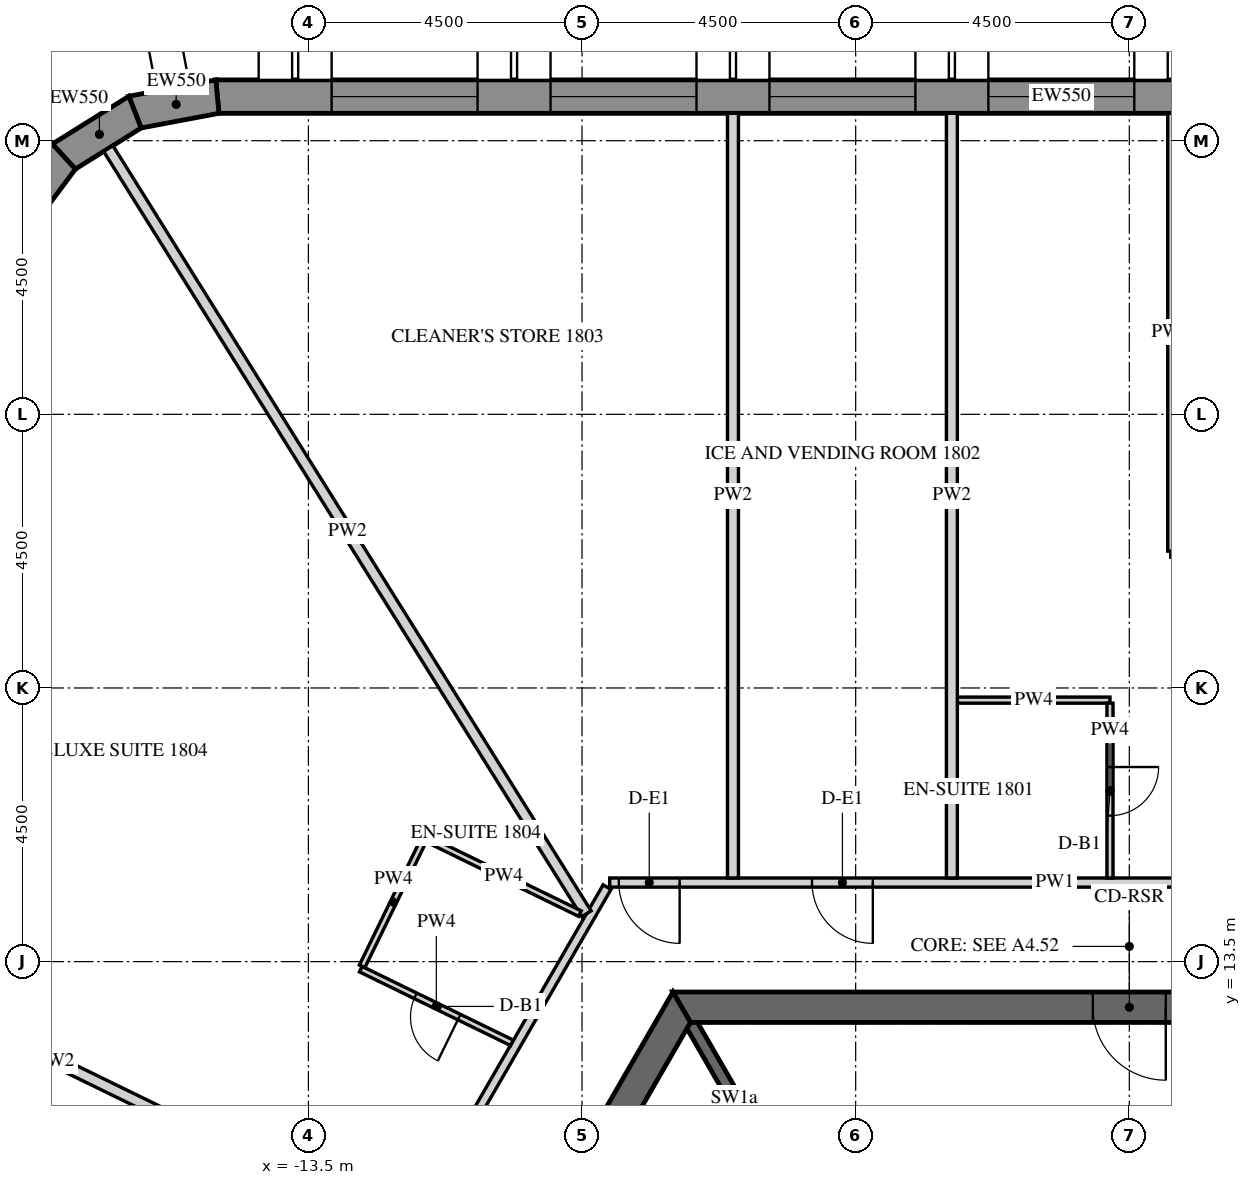
"""IFC4 building model, lengths in metres.
Left out: names, types, materials, properties, quantities, classifications, styles, units other than length and angle.
Written with IfcOpenShell. Run it as: python <this file> out.ifc"""

import sys

from ifc_helpers import new_model, si_unit, direction, frame, frame_2d, origin, place, context, subcontext, project, spatial, polyline, rectangle, outline, extrude, element, fill, save


model = new_model("IFC4")
c1 = context("Model", 3, precision=1e-05, world=origin(), true_north=direction((0.0, 1.0)))
c2 = subcontext(c1, "Body", "Model", "MODEL_VIEW")
j1 = project(units=[si_unit("LENGTHUNIT", "METRE"), si_unit("PLANEANGLEUNIT", "RADIAN")], contexts=[c1])
p1 = place(None, origin())
s1 = spatial("IfcSite", under=j1, at=p1, CompositionType="ELEMENT")
p2 = place(p1, origin())
s2 = spatial("IfcBuilding", under=s1, at=p2, CompositionType="ELEMENT")
p3 = place(p2, frame((0.0, 0.0, 226.8)))
s3 = spatial("IfcBuildingStorey", under=s2, at=p3, CompositionType="ELEMENT", Elevation=226.8)
p4 = place(p3, frame((12.761, 27.725, -0.15), z_axis=(0.0, 0.0, 1.0), x_axis=(-1.0, 0.0, 0.0)))
e1 = element("IfcWall", 1, at=p4, inside=s3, PredefinedType="SOLIDWALL", context=c2, shape_type="SweptSolid", body=[
    extrude(outline(polyline([(-0.022, -0.275), (27.783, -0.275), (27.732, 0.275), (0.022, 0.275), (-0.022, -0.275)])), origin(), (0.0, 0.0, 1.0), 3.9),
])
p5 = place(p4, frame((1.879, 0.0, 1.05)))
e2 = element("IfcOpeningElement", 2, at=p5, cuts=e1, PredefinedType="OPENING", context=c2, shape_type="SweptSolid", body=[
    extrude(rectangle(XDim=2.4, YDim=2.4, at=frame_2d((1.2, 1.2))), frame((0.0, 0.285, 0.0), z_axis=(0.0, -1.0, 0.0), x_axis=(1.0, 0.0, 0.0)), (0.0, 0.0, 1.0), 0.57),
])
p6 = place(p4, frame((5.479, 0.0, 1.05)))
e3 = element("IfcOpeningElement", 3, at=p6, cuts=e1, PredefinedType="OPENING", context=c2, shape_type="SweptSolid", body=[
    extrude(rectangle(XDim=2.4, YDim=2.4, at=frame_2d((1.2, 1.2))), frame((0.0, 0.285, 0.0), z_axis=(0.0, -1.0, 0.0), x_axis=(1.0, 0.0, 0.0)), (0.0, 0.0, 1.0), 0.57),
])
p7 = place(p4, frame((9.079, 0.0, 1.05)))
e4 = element("IfcOpeningElement", 4, at=p7, cuts=e1, PredefinedType="OPENING", context=c2, shape_type="SweptSolid", body=[
    extrude(rectangle(XDim=2.4, YDim=2.4, at=frame_2d((1.2, 1.2))), frame((0.0, 0.285, 0.0), z_axis=(0.0, -1.0, 0.0), x_axis=(1.0, 0.0, 0.0)), (0.0, 0.0, 1.0), 0.57),
])
p8 = place(p4, frame((12.679, 0.0, 1.05)))
e5 = element("IfcOpeningElement", 5, at=p8, cuts=e1, PredefinedType="OPENING", context=c2, shape_type="SweptSolid", body=[
    extrude(rectangle(XDim=2.4, YDim=2.4, at=frame_2d((1.2, 1.2))), frame((0.0, 0.285, 0.0), z_axis=(0.0, -1.0, 0.0), x_axis=(1.0, 0.0, 0.0)), (0.0, 0.0, 1.0), 0.57),
])
p9 = place(p4, frame((16.279, 0.0, 1.05)))
e6 = element("IfcOpeningElement", 6, at=p9, cuts=e1, PredefinedType="OPENING", context=c2, shape_type="SweptSolid", body=[
    extrude(rectangle(XDim=2.4, YDim=2.4, at=frame_2d((1.2, 1.2))), frame((0.0, 0.285, 0.0), z_axis=(0.0, -1.0, 0.0), x_axis=(1.0, 0.0, 0.0)), (0.0, 0.0, 1.0), 0.57),
])
p10 = place(p4, frame((19.879, 0.0, 1.05)))
e7 = element("IfcOpeningElement", 7, at=p10, cuts=e1, PredefinedType="OPENING", context=c2, shape_type="SweptSolid", body=[
    extrude(rectangle(XDim=2.4, YDim=2.4, at=frame_2d((1.2, 1.2))), frame((0.0, 0.285, 0.0), z_axis=(0.0, -1.0, 0.0), x_axis=(1.0, 0.0, 0.0)), (0.0, 0.0, 1.0), 0.57),
])
p11 = place(p4, frame((23.479, 0.0, 1.05)))
e8 = element("IfcOpeningElement", 8, at=p11, cuts=e1, PredefinedType="OPENING", context=c2, shape_type="SweptSolid", body=[
    extrude(rectangle(XDim=2.4, YDim=2.4, at=frame_2d((1.2, 1.2))), frame((0.0, 0.285, 0.0), z_axis=(0.0, -1.0, 0.0), x_axis=(1.0, 0.0, 0.0)), (0.0, 0.0, 1.0), 0.57),
])
p12 = place(p3, frame((-14.997, 27.725, -0.15), z_axis=(0.0, 0.0, 1.0), x_axis=(-0.982705443133, -0.185175624845, 0.0)))
e9 = element("IfcWall", 9, at=p12, inside=s3, PredefinedType="SOLIDWALL", context=c2, shape_type="SweptSolid", body=[
    extrude(outline(polyline([(-0.026, -0.275), (1.431, -0.275), (1.327, 0.275), (0.026, 0.275), (-0.026, -0.275)])), origin(), (0.0, 0.0, 1.0), 3.9),
])
p13 = place(p3, frame((-16.352, 27.47, -0.15), z_axis=(0.0, 0.0, 1.0), x_axis=(-0.848057977594, -0.5299034503, 0.0)))
e10 = element("IfcWall", 10, at=p13, inside=s3, PredefinedType="SOLIDWALL", context=c2, shape_type="SweptSolid", body=[
    extrude(outline(polyline([(-0.052, -0.275), (1.431, -0.275), (1.327, 0.275), (0.052, 0.275), (-0.052, -0.275)])), origin(), (0.0, 0.0, 1.0), 3.9),
])
p14 = place(p3, frame((-17.521, 26.739, -0.15), z_axis=(0.0, 0.0, 1.0), x_axis=(-0.597135295884, -0.802140535324, 0.0)))
e11 = element("IfcWall", 11, at=p14, inside=s3, PredefinedType="SOLIDWALL", context=c2, shape_type="SweptSolid", body=[
    extrude(outline(polyline([(-0.052, -0.275), (1.405, -0.275), (1.354, 0.275), (0.052, 0.275), (-0.052, -0.275)])), origin(), (0.0, 0.0, 1.0), 3.9),
])
p15 = place(p3, frame((-7.361, 12.75, -0.15), z_axis=(0.0, 0.0, 1.0), x_axis=(-0.50000571537, -0.866022103989, 0.0)))
e12 = element("IfcWall", 12, at=p15, inside=s3, PredefinedType="SHEAR", context=c2, shape_type="SweptSolid", body=[
    extrude(outline(polyline([(-0.144, -0.25), (14.867, -0.25), (14.578, 0.25), (0.144, 0.25), (-0.144, -0.25)])), origin(), (0.0, 0.0, 1.0), 3.9),
])
p16 = place(p15, frame((6.49, 0.0, 0.15)))
e13 = element("IfcOpeningElement", 13, at=p16, cuts=e12, PredefinedType="OPENING", context=c2, shape_type="SweptSolid", body=[
    extrude(rectangle(XDim=1.8, YDim=2.4, at=frame_2d((0.9, 1.2))), frame((0.0, 0.26, 0.0), z_axis=(0.0, -1.0, 0.0), x_axis=(1.0, 0.0, 0.0)), (0.0, 0.0, 1.0), 0.52),
])
p17 = place(p3, frame((7.361, 12.75, -0.15), z_axis=(0.0, 0.0, 1.0), x_axis=(-1.0, 0.0, 0.0)))
e14 = element("IfcWall", 14, at=p17, inside=s3, PredefinedType="SHEAR", context=c2, shape_type="SweptSolid", body=[
    extrude(outline(polyline([(-0.144, -0.25), (14.866, -0.25), (14.578, 0.25), (0.144, 0.25), (-0.144, -0.25)])), origin(), (0.0, 0.0, 1.0), 3.9),
])
p18 = place(p17, frame((6.761, 0.0, 0.15)))
e15 = element("IfcOpeningElement", 15, at=p18, cuts=e14, PredefinedType="OPENING", context=c2, shape_type="SweptSolid", body=[
    extrude(rectangle(XDim=1.2, YDim=2.4, at=frame_2d((0.6, 1.2))), frame((0.0, 0.26, 0.0), z_axis=(0.0, -1.0, 0.0), x_axis=(1.0, 0.0, 0.0)), (0.0, 0.0, 1.0), 0.52),
])
p19 = place(p3, frame((-5.773, 10.0, -0.15), z_axis=(0.0, 0.0, 1.0), x_axis=(-0.499995765644, 0.866027848477, 0.0)))
e16 = element("IfcWall", 16, at=p19, inside=s3, PredefinedType="SHEAR", context=c2, shape_type="SweptSolid", body=[
    extrude(rectangle(XDim=2.887, YDim=0.2, at=frame_2d((1.443, 0.0))), origin(), (0.0, 0.0, 1.0), 3.9),
])
p20 = place(p3, frame((6.091, 14.8, 0.0), z_axis=(0.0, 0.0, 1.0), x_axis=(-1.0, 0.0, 0.0)))
e17 = element("IfcWall", 17, at=p20, inside=s3, PredefinedType="PARTITIONING", context=c2, shape_type="SweptSolid", body=[
    extrude(rectangle(XDim=14.636, YDim=0.15, at=frame_2d((7.318, 0.0))), origin(), (0.0, 0.0, 1.0), 2.988),
])
p21 = place(p20, frame((2.661, 0.0, 0.0)))
e18 = element("IfcOpeningElement", 18, at=p21, cuts=e17, PredefinedType="OPENING", context=c2, shape_type="SweptSolid", body=[
    extrude(rectangle(XDim=1.0, YDim=2.1, at=frame_2d((0.5, 1.05))), frame((0.0, 0.085, 0.0), z_axis=(0.0, -1.0, 0.0), x_axis=(1.0, 0.0, 0.0)), (0.0, 0.0, 1.0), 0.17),
])
p22 = place(p20, frame((10.309, 0.0, 0.0)))
e19 = element("IfcOpeningElement", 19, at=p22, cuts=e17, PredefinedType="OPENING", context=c2, shape_type="SweptSolid", body=[
    extrude(rectangle(XDim=1.0, YDim=2.1, at=frame_2d((0.5, 1.05))), frame((0.0, 0.085, 0.0), z_axis=(0.0, -1.0, 0.0), x_axis=(1.0, 0.0, 0.0)), (0.0, 0.0, 1.0), 0.17),
])
p23 = place(p20, frame((13.486, 0.0, 0.0)))
e20 = element("IfcOpeningElement", 20, at=p23, cuts=e17, PredefinedType="OPENING", context=c2, shape_type="SweptSolid", body=[
    extrude(rectangle(XDim=1.0, YDim=2.1, at=frame_2d((0.5, 1.05))), frame((0.0, 0.085, 0.0), z_axis=(0.0, -1.0, 0.0), x_axis=(1.0, 0.0, 0.0)), (0.0, 0.0, 1.0), 0.17),
])
p24 = place(p3, frame((-8.588, 14.725, 0.0), z_axis=(0.0, 0.0, 1.0), x_axis=(-0.499999926766, -0.866025446066, 0.0)))
e21 = element("IfcWall", 21, at=p24, inside=s3, PredefinedType="PARTITIONING", context=c2, shape_type="SweptSolid", body=[
    extrude(rectangle(XDim=13.786, YDim=0.15, at=frame_2d((6.893, 0.0))), origin(), (0.0, 0.0, 1.0), 2.988),
])
p25 = place(p24, frame((4.276, 0.0, 0.0)))
e22 = element("IfcOpeningElement", 22, at=p25, cuts=e21, PredefinedType="OPENING", context=c2, shape_type="SweptSolid", body=[
    extrude(rectangle(XDim=1.0, YDim=2.1, at=frame_2d((0.5, 1.05))), frame((0.0, 0.085, 0.0), z_axis=(0.0, -1.0, 0.0), x_axis=(1.0, 0.0, 0.0)), (0.0, 0.0, 1.0), 0.17),
])
p26 = place(p24, frame((11.073, 0.0, 0.0)))
e23 = element("IfcOpeningElement", 23, at=p26, cuts=e21, PredefinedType="OPENING", context=c2, shape_type="SweptSolid", body=[
    extrude(rectangle(XDim=1.0, YDim=2.1, at=frame_2d((0.5, 1.05))), frame((0.0, 0.085, 0.0), z_axis=(0.0, -1.0, 0.0), x_axis=(1.0, 0.0, 0.0)), (0.0, 0.0, 1.0), 0.17),
])
p27 = place(p3, frame((-2.828, 17.8, 0.0), z_axis=(0.0, 0.0, 1.0), x_axis=(1.0, 0.0, 0.0)))
e24 = element("IfcWall", 24, at=p27, inside=s3, PredefinedType="PARTITIONING", context=c2, shape_type="SweptSolid", body=[
    extrude(rectangle(XDim=2.51, YDim=0.1, at=frame_2d((1.255, 0.0))), origin(), (0.0, 0.0, 1.0), 2.988),
])
p28 = place(p3, frame((-0.318, 17.75, 0.0), z_axis=(0.0, 0.0, 1.0), x_axis=(0.0, -1.0, 0.0)))
e25 = element("IfcWall", 25, at=p28, inside=s3, PredefinedType="PARTITIONING", context=c2, shape_type="SweptSolid", body=[
    extrude(rectangle(XDim=2.875, YDim=0.1, at=frame_2d((1.438, 0.0))), origin(), (0.0, 0.0, 1.0), 2.988),
])
p29 = place(p28, frame((1.05, 0.0, 0.0)))
e26 = element("IfcOpeningElement", 26, at=p29, cuts=e25, PredefinedType="OPENING", context=c2, shape_type="SweptSolid", body=[
    extrude(rectangle(XDim=0.8, YDim=2.1, at=frame_2d((0.4, 1.05))), frame((0.0, 0.06, 0.0), z_axis=(0.0, -1.0, 0.0), x_axis=(1.0, 0.0, 0.0)), (0.0, 0.0, 1.0), 0.12),
])
p30 = place(p3, frame((0.682, 20.25, 0.0), z_axis=(0.0, 0.0, 1.0), x_axis=(0.0, 1.0, 0.0)))
e27 = element("IfcWall", 27, at=p30, inside=s3, PredefinedType="PARTITIONING", context=c2, shape_type="SweptSolid", body=[
    extrude(rectangle(XDim=7.2, YDim=0.1, at=frame_2d((3.6, 0.0))), origin(), (0.0, 0.0, 1.0), 2.988),
])
for number, where, z_axis, x_axis in (
    (28, (-2.918, 27.45, 0.0), (0.0, 0.0, 1.0), (0.0, -1.0, 0.0)),
    (29, (-6.518, 27.45, 0.0), (0.0, 0.0, 1.0), (0.0, -1.0, 0.0)),
):
    element("IfcWall", number, at=place(p3, frame(where, z_axis=z_axis, x_axis=x_axis)), inside=s3, PredefinedType="PARTITIONING", context=c2, shape_type="SweptSolid", body=[
        extrude(rectangle(XDim=12.575, YDim=0.18, at=frame_2d((6.288, 0.0))), origin(), (0.0, 0.0, 1.0), 2.988),
    ])
p31 = place(p3, frame((-16.791, 26.871, 0.0), z_axis=(0.0, 0.0, 1.0), x_axis=(0.529927950822, -0.848042668111, 0.0)))
e30 = element("IfcWall", 30, at=p31, inside=s3, PredefinedType="PARTITIONING", context=c2, shape_type="SweptSolid", body=[
    extrude(rectangle(XDim=14.839, YDim=0.18, at=frame_2d((7.419, 0.0))), origin(), (0.0, 0.0, 1.0), 2.988),
])
p32 = place(p3, frame((-10.153, 12.164, 0.0), z_axis=(0.0, 0.0, 1.0), x_axis=(-0.898780323471, 0.438399281638, 0.0)))
e31 = element("IfcWall", 31, at=p32, inside=s3, PredefinedType="PARTITIONING", context=c2, shape_type="SweptSolid", body=[
    extrude(rectangle(XDim=2.766, YDim=0.1, at=frame_2d((1.383, 0.0))), origin(), (0.0, 0.0, 1.0), 2.988),
])
p33 = place(p32, frame((0.966, 0.0, 0.0)))
e32 = element("IfcOpeningElement", 32, at=p33, cuts=e31, PredefinedType="OPENING", context=c2, shape_type="SweptSolid", body=[
    extrude(rectangle(XDim=0.8, YDim=2.1, at=frame_2d((0.4, 1.05))), frame((0.0, 0.06, 0.0), z_axis=(0.0, -1.0, 0.0), x_axis=(1.0, 0.0, 0.0)), (0.0, 0.0, 1.0), 0.12),
])
p34 = place(p3, frame((-12.617, 13.422, 0.0), z_axis=(0.0, 0.0, 1.0), x_axis=(0.438298773825, 0.898829341345, 0.0)))
e33 = element("IfcWall", 33, at=p34, inside=s3, PredefinedType="PARTITIONING", context=c2, shape_type="SweptSolid", body=[
    extrude(rectangle(XDim=2.35, YDim=0.1, at=frame_2d((1.175, 0.0))), origin(), (0.0, 0.0, 1.0), 2.988),
])
p35 = place(p3, frame((-11.542, 15.512, 0.0), z_axis=(0.0, 0.0, 1.0), x_axis=(0.898813033265, -0.438332215599, 0.0)))
e34 = element("IfcWall", 34, at=p35, inside=s3, PredefinedType="PARTITIONING", context=c2, shape_type="SweptSolid", body=[
    extrude(rectangle(XDim=2.789, YDim=0.1, at=frame_2d((1.395, 0.0))), origin(), (0.0, 0.0, 1.0), 2.988),
])
p36 = place(p3, frame((-23.393, 14.656, 0.0), z_axis=(0.0, 0.0, 1.0), x_axis=(0.898790356386, -0.438378712152, 0.0)))
e35 = element("IfcWall", 35, at=p36, inside=s3, PredefinedType="PARTITIONING", context=c2, shape_type="SweptSolid", body=[
    extrude(rectangle(XDim=12.743, YDim=0.18, at=frame_2d((6.372, 0.0))), origin(), (0.0, 0.0, 1.0), 2.988),
])
p37 = place(p8, frame((0.0, 0.205, 0.0)))
e36 = element("IfcWindow", 36, at=p37, inside=s3, PartitioningType="DOUBLE_PANEL_VERTICAL", PredefinedType="WINDOW", context=c2, shape_type="SweptSolid", body=[
    extrude(rectangle(XDim=2.4, YDim=2.4, at=frame_2d((1.2, 1.2))), frame((0.0, 0.03, 0.0), z_axis=(0.0, -1.0, 0.0), x_axis=(1.0, 0.0, 0.0)), (0.0, 0.0, 1.0), 0.06),
])
fill(e5, e36)
p38 = place(p9, frame((0.0, 0.205, 0.0)))
e37 = element("IfcWindow", 37, at=p38, inside=s3, PartitioningType="DOUBLE_PANEL_VERTICAL", PredefinedType="WINDOW", context=c2, shape_type="SweptSolid", body=[
    extrude(rectangle(XDim=2.4, YDim=2.4, at=frame_2d((1.2, 1.2))), frame((0.0, 0.03, 0.0), z_axis=(0.0, -1.0, 0.0), x_axis=(1.0, 0.0, 0.0)), (0.0, 0.0, 1.0), 0.06),
])
fill(e6, e37)
p39 = place(p10, frame((0.0, 0.205, 0.0)))
e38 = element("IfcWindow", 38, at=p39, inside=s3, PartitioningType="DOUBLE_PANEL_VERTICAL", PredefinedType="WINDOW", context=c2, shape_type="SweptSolid", body=[
    extrude(rectangle(XDim=2.4, YDim=2.4, at=frame_2d((1.2, 1.2))), frame((0.0, 0.03, 0.0), z_axis=(0.0, -1.0, 0.0), x_axis=(1.0, 0.0, 0.0)), (0.0, 0.0, 1.0), 0.06),
])
fill(e7, e38)
p40 = place(p11, frame((0.0, 0.205, 0.0)))
e39 = element("IfcWindow", 39, at=p40, inside=s3, PartitioningType="DOUBLE_PANEL_VERTICAL", PredefinedType="WINDOW", context=c2, shape_type="SweptSolid", body=[
    extrude(rectangle(XDim=2.4, YDim=2.4, at=frame_2d((1.2, 1.2))), frame((0.0, 0.03, 0.0), z_axis=(0.0, -1.0, 0.0), x_axis=(1.0, 0.0, 0.0)), (0.0, 0.0, 1.0), 0.06),
])
fill(e8, e39)
p41 = place(p18, origin())
e40 = element("IfcDoor", 40, at=p41, inside=s3, OperationType="SINGLE_SWING_LEFT", PredefinedType="DOOR", context=c2, shape_type="SweptSolid", body=[
    extrude(rectangle(XDim=1.2, YDim=2.4, at=frame_2d((0.6, 1.2))), frame((0.0, 0.025, 0.0), z_axis=(0.0, -1.0, 0.0), x_axis=(1.0, 0.0, 0.0)), (0.0, 0.0, 1.0), 0.05),
])
fill(e15, e40)
p42 = place(p29, origin())
e41 = element("IfcDoor", 41, at=p42, inside=s3, OperationType="SINGLE_SWING_LEFT", PredefinedType="DOOR", context=c2, shape_type="SweptSolid", body=[
    extrude(rectangle(XDim=0.8, YDim=2.1, at=frame_2d((0.4, 1.05))), frame((0.0, 0.025, 0.0), z_axis=(0.0, -1.0, 0.0), x_axis=(1.0, 0.0, 0.0)), (0.0, 0.0, 1.0), 0.05),
])
fill(e26, e41)
p43 = place(p22, origin())
e42 = element("IfcDoor", 42, at=p43, inside=s3, OperationType="SINGLE_SWING_RIGHT", PredefinedType="DOOR", context=c2, shape_type="SweptSolid", body=[
    extrude(rectangle(XDim=1.0, YDim=2.1, at=frame_2d((0.5, 1.05))), frame((0.0, 0.025, 0.0), z_axis=(0.0, -1.0, 0.0), x_axis=(1.0, 0.0, 0.0)), (0.0, 0.0, 1.0), 0.05),
])
fill(e19, e42)
p44 = place(p23, origin())
e43 = element("IfcDoor", 43, at=p44, inside=s3, OperationType="SINGLE_SWING_LEFT", PredefinedType="DOOR", context=c2, shape_type="SweptSolid", body=[
    extrude(rectangle(XDim=1.0, YDim=2.1, at=frame_2d((0.5, 1.05))), frame((0.0, 0.025, 0.0), z_axis=(0.0, -1.0, 0.0), x_axis=(1.0, 0.0, 0.0)), (0.0, 0.0, 1.0), 0.05),
])
fill(e20, e43)
p45 = place(p33, origin())
e44 = element("IfcDoor", 44, at=p45, inside=s3, OperationType="SINGLE_SWING_LEFT", PredefinedType="DOOR", context=c2, shape_type="SweptSolid", body=[
    extrude(rectangle(XDim=0.8, YDim=2.1, at=frame_2d((0.4, 1.05))), frame((0.0, 0.025, 0.0), z_axis=(0.0, -1.0, 0.0), x_axis=(1.0, 0.0, 0.0)), (0.0, 0.0, 1.0), 0.05),
])
fill(e32, e44)
save(model, sys.argv[1])
